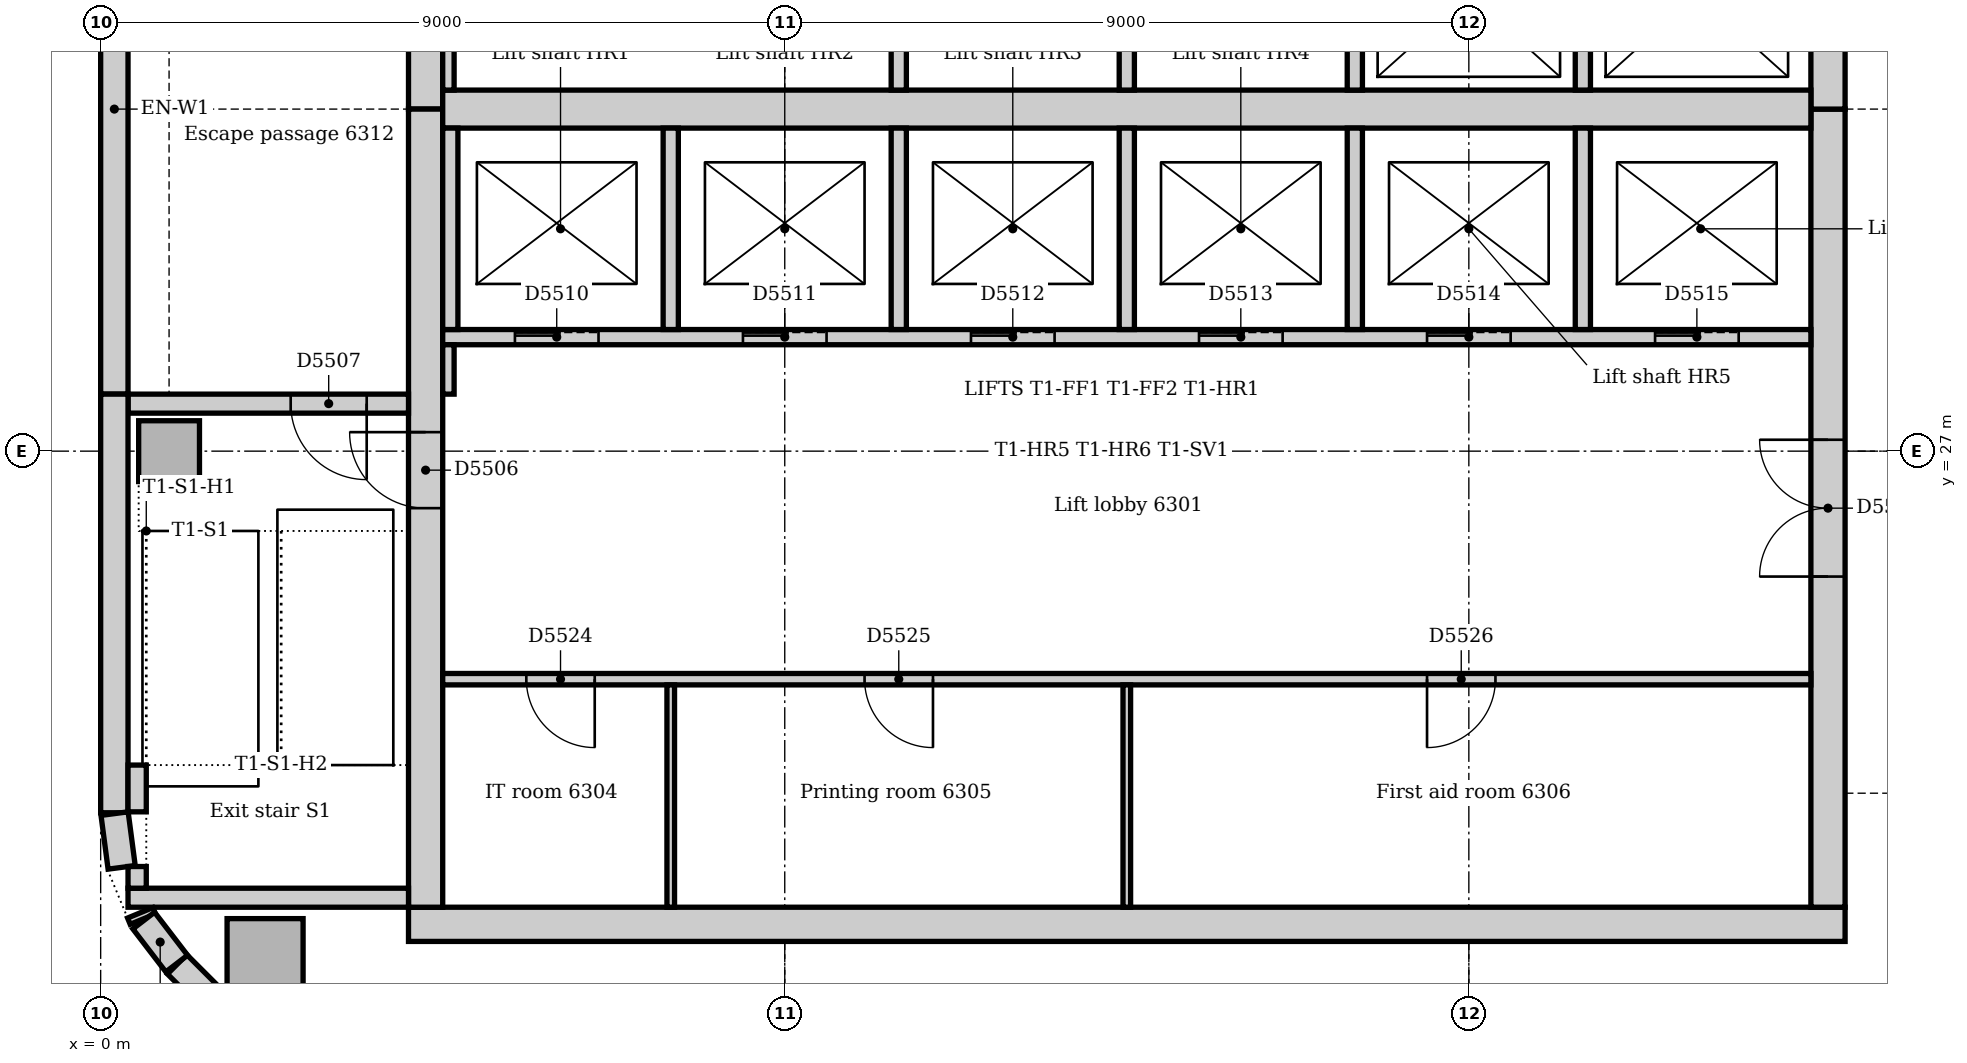
"""IFC4 building model, lengths in metres.
Left out: names, types, materials, properties, quantities, classifications, styles, units other than length and angle.
Written with IfcOpenShell. Run it as: python <this file> out.ifc"""

import sys

from ifc_helpers import new_model, si_unit, direction, frame, frame_2d, origin, origin_2d, place, context, subcontext, project, spatial, rectangle, extrude, element, fill, save


model = new_model("IFC4")
c1 = context("Model", 3, precision=1e-05, world=origin(), true_north=direction((0.0, 1.0)))
c2 = subcontext(c1, "Body", "Model", "MODEL_VIEW")
j1 = project(units=[si_unit("LENGTHUNIT", "METRE"), si_unit("PLANEANGLEUNIT", "RADIAN")], contexts=[c1])
p1 = place(None, origin())
s1 = spatial("IfcSite", under=j1, at=p1, CompositionType="ELEMENT")
p2 = place(p1, origin())
s2 = spatial("IfcBuilding", under=s1, at=p2, CompositionType="ELEMENT")
p3 = place(p2, frame((0.0, 0.0, 263.0)))
s3 = spatial("IfcBuildingStorey", under=s2, at=p3, CompositionType="ELEMENT", Elevation=263.0)
p4 = place(p3, frame((4.05, 20.775, 0.0), z_axis=(0.0, 0.0, 1.0), x_axis=(1.0, 0.0, 0.0)))
e1 = element("IfcWall", 1, at=p4, inside=s3, PredefinedType="SOLIDWALL", context=c2, shape_type="SweptSolid", body=[
    extrude(rectangle(XDim=18.9, YDim=0.45, at=frame_2d((9.45, 0.0))), origin(), (0.0, 0.0, 1.0), 4.0),
])
p5 = place(p3, frame((22.725, 21.0, 0.0), z_axis=(0.0, 0.0, 1.0), x_axis=(0.0, 1.0, 0.0)))
e2 = element("IfcWall", 2, at=p5, inside=s3, PredefinedType="SOLIDWALL", context=c2, shape_type="SweptSolid", body=[
    extrude(rectangle(XDim=10.5, YDim=0.45, at=frame_2d((5.25, 0.0))), origin(), (0.0, 0.0, 1.0), 4.0),
])
p6 = place(p5, frame((4.35, 0.0, 0.0)))
e3 = element("IfcOpeningElement", 3, at=p6, cuts=e2, PredefinedType="OPENING", context=c2, shape_type="SweptSolid", body=[
    extrude(rectangle(XDim=1.8, YDim=2.1, at=frame_2d((0.9, 1.05))), frame((0.0, 0.235, 0.0), z_axis=(0.0, -1.0, 0.0), x_axis=(1.0, 0.0, 0.0)), (0.0, 0.0, 1.0), 0.47),
])
p7 = place(p3, frame((22.725, 31.5, 0.0), z_axis=(0.0, 0.0, 1.0), x_axis=(0.0, 1.0, 0.0)))
e4 = element("IfcWall", 4, at=p7, inside=s3, PredefinedType="SOLIDWALL", context=c2, shape_type="SweptSolid", body=[
    extrude(rectangle(XDim=10.5, YDim=0.45, at=frame_2d((5.25, 0.0))), origin(), (0.0, 0.0, 1.0), 4.0),
])
p8 = place(p7, frame((3.15, 0.0, 0.0)))
e5 = element("IfcOpeningElement", 5, at=p8, cuts=e4, PredefinedType="OPENING", context=c2, shape_type="SweptSolid", body=[
    extrude(rectangle(XDim=1.0, YDim=2.1, at=frame_2d((0.5, 1.05))), frame((0.0, 0.235, 0.0), z_axis=(0.0, -1.0, 0.0), x_axis=(1.0, 0.0, 0.0)), (0.0, 0.0, 1.0), 0.47),
])
p9 = place(p7, frame((5.2, 0.0, 0.0)))
e6 = element("IfcOpeningElement", 6, at=p9, cuts=e4, PredefinedType="OPENING", context=c2, shape_type="SweptSolid", body=[
    extrude(rectangle(XDim=1.0, YDim=2.1, at=frame_2d((0.5, 1.05))), frame((0.0, 0.235, 0.0), z_axis=(0.0, -1.0, 0.0), x_axis=(1.0, 0.0, 0.0)), (0.0, 0.0, 1.0), 0.47),
])
p10 = place(p3, frame((4.275, 42.0, 0.0), z_axis=(0.0, 0.0, 1.0), x_axis=(0.0, -1.0, 0.0)))
e7 = element("IfcWall", 7, at=p10, inside=s3, PredefinedType="SOLIDWALL", context=c2, shape_type="SweptSolid", body=[
    extrude(rectangle(XDim=10.5, YDim=0.45, at=frame_2d((5.25, 0.0))), origin(), (0.0, 0.0, 1.0), 4.0),
])
p11 = place(p10, frame((5.3, 0.0, 0.0)))
e8 = element("IfcOpeningElement", 8, at=p11, cuts=e7, PredefinedType="OPENING", context=c2, shape_type="SweptSolid", body=[
    extrude(rectangle(XDim=1.0, YDim=2.1, at=frame_2d((0.5, 1.05))), frame((0.0, 0.235, 0.0), z_axis=(0.0, -1.0, 0.0), x_axis=(1.0, 0.0, 0.0)), (0.0, 0.0, 1.0), 0.47),
])
p12 = place(p3, frame((4.275, 31.5, 0.0), z_axis=(0.0, 0.0, 1.0), x_axis=(0.0, -1.0, 0.0)))
e9 = element("IfcWall", 9, at=p12, inside=s3, PredefinedType="SOLIDWALL", context=c2, shape_type="SweptSolid", body=[
    extrude(rectangle(XDim=10.5, YDim=0.45, at=frame_2d((5.25, 0.0))), origin(), (0.0, 0.0, 1.0), 4.0),
])
p13 = place(p12, frame((4.25, 0.0, 0.0)))
e10 = element("IfcOpeningElement", 10, at=p13, cuts=e9, PredefinedType="OPENING", context=c2, shape_type="SweptSolid", body=[
    extrude(rectangle(XDim=1.0, YDim=2.1, at=frame_2d((0.5, 1.05))), frame((0.0, 0.235, 0.0), z_axis=(0.0, -1.0, 0.0), x_axis=(1.0, 0.0, 0.0)), (0.0, 0.0, 1.0), 0.47),
])
p14 = place(p3, frame((4.5, 31.5, 0.0), z_axis=(0.0, 0.0, 1.0), x_axis=(1.0, 0.0, 0.0)))
e11 = element("IfcWall", 11, at=p14, inside=s3, PredefinedType="SOLIDWALL", context=c2, shape_type="SweptSolid", body=[
    extrude(rectangle(XDim=18.0, YDim=0.5, at=frame_2d((9.0, 0.0))), origin(), (0.0, 0.0, 1.0), 4.0),
])
p15 = place(p3, frame((0.36, 21.125, 0.0), z_axis=(0.0, 0.0, 1.0), x_axis=(1.0, 0.0, 0.0)))
e12 = element("IfcWall", 12, at=p15, inside=s3, PredefinedType="SOLIDWALL", context=c2, shape_type="SweptSolid", body=[
    extrude(rectangle(XDim=3.69, YDim=0.25, at=frame_2d((1.845, 0.0))), origin(), (0.0, 0.0, 1.0), 4.0),
])
p16 = place(p3, frame((4.05, 27.625, 0.0), z_axis=(0.0, 0.0, 1.0), x_axis=(-1.0, 0.0, 0.0)))
e13 = element("IfcWall", 13, at=p16, inside=s3, PredefinedType="SOLIDWALL", context=c2, shape_type="SweptSolid", body=[
    extrude(rectangle(XDim=3.69, YDim=0.25, at=frame_2d((1.845, 0.0))), origin(), (0.0, 0.0, 1.0), 4.0),
])
p17 = place(p16, frame((0.55, 0.0, 0.0)))
e14 = element("IfcOpeningElement", 14, at=p17, cuts=e13, PredefinedType="OPENING", context=c2, shape_type="SweptSolid", body=[
    extrude(rectangle(XDim=1.0, YDim=2.1, at=frame_2d((0.5, 1.05))), frame((0.0, 0.135, 0.0), z_axis=(0.0, -1.0, 0.0), x_axis=(1.0, 0.0, 0.0)), (0.0, 0.0, 1.0), 0.27),
])
p18 = place(p3, frame((2.163, 20.35, 0.0), z_axis=(0.0, 0.0, 1.0), x_axis=(1.0, 0.0, 0.0)))
e15 = element("IfcColumn", 15, at=p18, inside=s3, PredefinedType="COLUMN", context=c2, shape_type="SweptSolid", body=[
    extrude(rectangle(XDim=1.0, YDim=1.0, at=origin_2d()), origin(), (0.0, 0.0, 1.0), 3.85),
])
p19 = place(p3, frame((0.9, 27.0, 0.0), z_axis=(0.0, 0.0, 1.0), x_axis=(1.0, 0.0, 0.0)))
e16 = element("IfcColumn", 16, at=p19, inside=s3, PredefinedType="COLUMN", context=c2, shape_type="SweptSolid", body=[
    extrude(rectangle(XDim=0.8, YDim=0.8, at=origin_2d()), origin(), (0.0, 0.0, 1.0), 4.0),
])
p20 = place(p3, frame((0.18, 35.25, 0.0), z_axis=(0.0, 0.0, 1.0), x_axis=(0.0, -1.0, 0.0)))
e17 = element("IfcWall", 17, at=p20, inside=s3, PredefinedType="STANDARD", context=c2, shape_type="SweptSolid", body=[
    extrude(rectangle(XDim=7.5, YDim=0.36, at=frame_2d((3.75, 0.0))), origin(), (0.0, 0.0, 1.0), 3.85),
])
p21 = place(p3, frame((0.18, 27.75, 0.0), z_axis=(0.0, 0.0, 1.0), x_axis=(0.0, -1.0, 0.0)))
e18 = element("IfcWall", 18, at=p21, inside=s3, PredefinedType="STANDARD", context=c2, shape_type="SweptSolid", body=[
    extrude(rectangle(XDim=5.507, YDim=0.36, at=frame_2d((2.754, 0.0))), origin(), (0.0, 0.0, 1.0), 3.85),
])
p22 = place(p3, frame((1.006, 20.249, 0.0), z_axis=(0.0, 0.0, 1.0), x_axis=(0.707106781187, -0.707106781187, 0.0)))
e19 = element("IfcWall", 19, at=p22, inside=s3, PredefinedType="STANDARD", context=c2, shape_type="SweptSolid", body=[
    extrude(rectangle(XDim=1.757, YDim=0.36, at=frame_2d((0.879, 0.0))), origin(), (0.0, 0.0, 1.0), 3.85),
])
p23 = place(p3, frame((0.183, 22.231, 0.0), z_axis=(0.0, 0.0, 1.0), x_axis=(0.13055608231, -0.99144092581, 0.0)))
e20 = element("IfcWall", 20, at=p23, inside=s3, PredefinedType="STANDARD", context=c2, shape_type="SweptSolid", body=[
    extrude(rectangle(XDim=0.713, YDim=0.36, at=frame_2d((0.356, 0.0))), origin(), (0.0, 0.0, 1.0), 3.85),
])
p24 = place(p3, frame((0.521, 20.927, 0.0), z_axis=(0.0, 0.0, 1.0), x_axis=(0.382549378284, -0.923935048136, 0.0)))
e21 = element("IfcWall", 21, at=p24, inside=s3, PredefinedType="STANDARD", context=c2, shape_type="SweptSolid", body=[
    extrude(rectangle(XDim=0.089, YDim=0.36, at=frame_2d((0.045, 0.0))), origin(), (0.0, 0.0, 1.0), 3.85),
])
p25 = place(p3, frame((0.566, 20.825, 0.0), z_axis=(0.0, 0.0, 1.0), x_axis=(0.608802368033, -0.793321924995, 0.0)))
e22 = element("IfcWall", 22, at=p25, inside=s3, PredefinedType="STANDARD", context=c2, shape_type="SweptSolid", body=[
    extrude(rectangle(XDim=0.713, YDim=0.36, at=frame_2d((0.357, 0.0))), origin(), (0.0, 0.0, 1.0), 3.85),
])
p26 = place(p3, frame((0.48, 21.25, 0.0), z_axis=(0.0, 0.0, 1.0), x_axis=(0.0, 1.0, 0.0)))
e23 = element("IfcWall", 23, at=p26, inside=s3, PredefinedType="STANDARD", context=c2, shape_type="SweptSolid", body=[
    extrude(rectangle(XDim=0.285, YDim=0.24, at=frame_2d((0.143, 0.0))), origin(), (0.0, 0.0, 1.0), 4.0),
])
p27 = place(p3, frame((0.48, 22.255, 0.0), z_axis=(0.0, 0.0, 1.0), x_axis=(0.0, 1.0, 0.0)))
e24 = element("IfcWall", 24, at=p27, inside=s3, PredefinedType="STANDARD", context=c2, shape_type="SweptSolid", body=[
    extrude(rectangle(XDim=0.615, YDim=0.24, at=frame_2d((0.307, 0.0))), origin(), (0.0, 0.0, 1.0), 4.0),
])
p28 = place(p3, frame((4.5, 28.5, 0.0), z_axis=(0.0, 0.0, 1.0), x_axis=(1.0, 0.0, 0.0)))
e25 = element("IfcWall", 25, at=p28, inside=s3, PredefinedType="PARTITIONING", context=c2, shape_type="SweptSolid", body=[
    extrude(rectangle(XDim=18.0, YDim=0.2, at=frame_2d((9.0, 0.0))), origin(), (0.0, 0.0, 1.0), 3.85),
])
p29 = place(p28, frame((0.95, 0.0, 0.0)))
e26 = element("IfcOpeningElement", 26, at=p29, cuts=e25, PredefinedType="OPENING", context=c2, shape_type="SweptSolid", body=[
    extrude(rectangle(XDim=1.1, YDim=2.1, at=frame_2d((0.55, 1.05))), frame((0.0, 0.11, 0.0), z_axis=(0.0, -1.0, 0.0), x_axis=(1.0, 0.0, 0.0)), (0.0, 0.0, 1.0), 0.22),
])
p30 = place(p28, frame((3.95, 0.0, 0.0)))
e27 = element("IfcOpeningElement", 27, at=p30, cuts=e25, PredefinedType="OPENING", context=c2, shape_type="SweptSolid", body=[
    extrude(rectangle(XDim=1.1, YDim=2.1, at=frame_2d((0.55, 1.05))), frame((0.0, 0.11, 0.0), z_axis=(0.0, -1.0, 0.0), x_axis=(1.0, 0.0, 0.0)), (0.0, 0.0, 1.0), 0.22),
])
p31 = place(p28, frame((6.95, 0.0, 0.0)))
e28 = element("IfcOpeningElement", 28, at=p31, cuts=e25, PredefinedType="OPENING", context=c2, shape_type="SweptSolid", body=[
    extrude(rectangle(XDim=1.1, YDim=2.1, at=frame_2d((0.55, 1.05))), frame((0.0, 0.11, 0.0), z_axis=(0.0, -1.0, 0.0), x_axis=(1.0, 0.0, 0.0)), (0.0, 0.0, 1.0), 0.22),
])
p32 = place(p28, frame((9.95, 0.0, 0.0)))
e29 = element("IfcOpeningElement", 29, at=p32, cuts=e25, PredefinedType="OPENING", context=c2, shape_type="SweptSolid", body=[
    extrude(rectangle(XDim=1.1, YDim=2.1, at=frame_2d((0.55, 1.05))), frame((0.0, 0.11, 0.0), z_axis=(0.0, -1.0, 0.0), x_axis=(1.0, 0.0, 0.0)), (0.0, 0.0, 1.0), 0.22),
])
p33 = place(p28, frame((12.95, 0.0, 0.0)))
e30 = element("IfcOpeningElement", 30, at=p33, cuts=e25, PredefinedType="OPENING", context=c2, shape_type="SweptSolid", body=[
    extrude(rectangle(XDim=1.1, YDim=2.1, at=frame_2d((0.55, 1.05))), frame((0.0, 0.11, 0.0), z_axis=(0.0, -1.0, 0.0), x_axis=(1.0, 0.0, 0.0)), (0.0, 0.0, 1.0), 0.22),
])
p34 = place(p28, frame((15.95, 0.0, 0.0)))
e31 = element("IfcOpeningElement", 31, at=p34, cuts=e25, PredefinedType="OPENING", context=c2, shape_type="SweptSolid", body=[
    extrude(rectangle(XDim=1.1, YDim=2.1, at=frame_2d((0.55, 1.05))), frame((0.0, 0.11, 0.0), z_axis=(0.0, -1.0, 0.0), x_axis=(1.0, 0.0, 0.0)), (0.0, 0.0, 1.0), 0.22),
])
for number, where, z_axis, x_axis in (
    (32, (10.5, 28.6, 0.0), (0.0, 0.0, 1.0), (0.0, 1.0, 0.0)),
    (33, (10.5, 31.75, 0.0), (0.0, 0.0, 1.0), (0.0, 1.0, 0.0)),
    (34, (13.5, 28.6, 0.0), (0.0, 0.0, 1.0), (0.0, 1.0, 0.0)),
    (35, (13.5, 31.75, 0.0), (0.0, 0.0, 1.0), (0.0, 1.0, 0.0)),
    (36, (16.5, 28.6, 0.0), (0.0, 0.0, 1.0), (0.0, 1.0, 0.0)),
    (37, (16.5, 31.75, 0.0), (0.0, 0.0, 1.0), (0.0, 1.0, 0.0)),
    (38, (19.5, 28.6, 0.0), (0.0, 0.0, 1.0), (0.0, 1.0, 0.0)),
    (39, (19.5, 31.75, 0.0), (0.0, 0.0, 1.0), (0.0, 1.0, 0.0)),
    (40, (4.6, 28.6, 0.0), (0.0, 0.0, 1.0), (0.0, 1.0, 0.0)),
    (41, (7.5, 28.6, 0.0), (0.0, 0.0, 1.0), (0.0, 1.0, 0.0)),
):
    element("IfcWall", number, at=place(p3, frame(where, z_axis=z_axis, x_axis=x_axis)), inside=s3, PredefinedType="PARTITIONING", context=c2, shape_type="SweptSolid", body=[
        extrude(rectangle(XDim=2.65, YDim=0.2, at=frame_2d((1.325, 0.0))), origin(), (0.0, 0.0, 1.0), 3.85),
    ])
p35 = place(p3, frame((4.5, 24.0, 0.0), z_axis=(0.0, 0.0, 1.0), x_axis=(1.0, 0.0, 0.0)))
e42 = element("IfcWall", 42, at=p35, inside=s3, PredefinedType="PARTITIONING", context=c2, shape_type="SweptSolid", body=[
    extrude(rectangle(XDim=18.0, YDim=0.15, at=frame_2d((9.0, 0.0))), origin(), (0.0, 0.0, 1.0), 3.85),
])
p36 = place(p35, frame((1.1, 0.0, 0.0)))
e43 = element("IfcOpeningElement", 43, at=p36, cuts=e42, PredefinedType="OPENING", context=c2, shape_type="SweptSolid", body=[
    extrude(rectangle(XDim=0.9, YDim=2.1, at=frame_2d((0.45, 1.05))), frame((0.0, 0.085, 0.0), z_axis=(0.0, -1.0, 0.0), x_axis=(1.0, 0.0, 0.0)), (0.0, 0.0, 1.0), 0.17),
])
p37 = place(p35, frame((5.55, 0.0, 0.0)))
e44 = element("IfcOpeningElement", 44, at=p37, cuts=e42, PredefinedType="OPENING", context=c2, shape_type="SweptSolid", body=[
    extrude(rectangle(XDim=0.9, YDim=2.1, at=frame_2d((0.45, 1.05))), frame((0.0, 0.085, 0.0), z_axis=(0.0, -1.0, 0.0), x_axis=(1.0, 0.0, 0.0)), (0.0, 0.0, 1.0), 0.17),
])
p38 = place(p35, frame((12.95, 0.0, 0.0)))
e45 = element("IfcOpeningElement", 45, at=p38, cuts=e42, PredefinedType="OPENING", context=c2, shape_type="SweptSolid", body=[
    extrude(rectangle(XDim=0.9, YDim=2.1, at=frame_2d((0.45, 1.05))), frame((0.0, 0.085, 0.0), z_axis=(0.0, -1.0, 0.0), x_axis=(1.0, 0.0, 0.0)), (0.0, 0.0, 1.0), 0.17),
])
p39 = place(p3, frame((4.575, 31.75, 0.0), z_axis=(0.0, 0.0, 1.0), x_axis=(0.0, 1.0, 0.0)))
e46 = element("IfcWall", 46, at=p39, inside=s3, PredefinedType="PARTITIONING", context=c2, shape_type="SweptSolid", body=[
    extrude(rectangle(XDim=2.675, YDim=0.15, at=frame_2d((1.337, 0.0))), origin(), (0.0, 0.0, 1.0), 3.85),
])
p40 = place(p3, frame((4.575, 27.75, 0.0), z_axis=(0.0, 0.0, 1.0), x_axis=(0.0, 1.0, 0.0)))
e47 = element("IfcWall", 47, at=p40, inside=s3, PredefinedType="PARTITIONING", context=c2, shape_type="SweptSolid", body=[
    extrude(rectangle(XDim=0.65, YDim=0.15, at=frame_2d((0.325, 0.0))), origin(), (0.0, 0.0, 1.0), 3.85),
])
for number, where, z_axis, x_axis in (
    (48, (7.5, 21.0, 0.0), (0.0, 0.0, 1.0), (0.0, 1.0, 0.0)),
    (49, (13.5, 21.0, 0.0), (0.0, 0.0, 1.0), (0.0, 1.0, 0.0)),
):
    element("IfcWall", number, at=place(p3, frame(where, z_axis=z_axis, x_axis=x_axis)), inside=s3, PredefinedType="PARTITIONING", context=c2, shape_type="SweptSolid", body=[
        extrude(rectangle(XDim=2.925, YDim=0.1, at=frame_2d((1.462, 0.0))), origin(), (0.0, 0.0, 1.0), 3.85),
    ])
p41 = place(p13, frame((1.0, 0.0, 0.0), z_axis=(0.0, 0.0, 1.0), x_axis=(-1.0, 0.0, 0.0)))
e50 = element("IfcDoor", 50, at=p41, inside=s3, OperationType="SINGLE_SWING_RIGHT", PredefinedType="DOOR", context=c2, shape_type="SweptSolid", body=[
    extrude(rectangle(XDim=1.0, YDim=2.1, at=frame_2d((0.5, 1.05))), frame((0.0, 0.025, 0.0), z_axis=(0.0, -1.0, 0.0), x_axis=(1.0, 0.0, 0.0)), (0.0, 0.0, 1.0), 0.05),
])
fill(e10, e50)
p42 = place(p17, origin())
e51 = element("IfcDoor", 51, at=p42, inside=s3, OperationType="SINGLE_SWING_LEFT", PredefinedType="DOOR", context=c2, shape_type="SweptSolid", body=[
    extrude(rectangle(XDim=1.0, YDim=2.1, at=frame_2d((0.5, 1.05))), frame((0.0, 0.025, 0.0), z_axis=(0.0, -1.0, 0.0), x_axis=(1.0, 0.0, 0.0)), (0.0, 0.0, 1.0), 0.05),
])
fill(e14, e51)
p43 = place(p29, origin())
e52 = element("IfcDoor", 52, at=p43, inside=s3, OperationType="SLIDING_TO_LEFT", PredefinedType="DOOR", context=c2, shape_type="SweptSolid", body=[
    extrude(rectangle(XDim=1.1, YDim=2.1, at=frame_2d((0.55, 1.05))), frame((0.0, 0.025, 0.0), z_axis=(0.0, -1.0, 0.0), x_axis=(1.0, 0.0, 0.0)), (0.0, 0.0, 1.0), 0.05),
])
fill(e26, e52)
p44 = place(p30, origin())
e53 = element("IfcDoor", 53, at=p44, inside=s3, OperationType="SLIDING_TO_LEFT", PredefinedType="DOOR", context=c2, shape_type="SweptSolid", body=[
    extrude(rectangle(XDim=1.1, YDim=2.1, at=frame_2d((0.55, 1.05))), frame((0.0, 0.025, 0.0), z_axis=(0.0, -1.0, 0.0), x_axis=(1.0, 0.0, 0.0)), (0.0, 0.0, 1.0), 0.05),
])
fill(e27, e53)
p45 = place(p31, origin())
e54 = element("IfcDoor", 54, at=p45, inside=s3, OperationType="SLIDING_TO_LEFT", PredefinedType="DOOR", context=c2, shape_type="SweptSolid", body=[
    extrude(rectangle(XDim=1.1, YDim=2.1, at=frame_2d((0.55, 1.05))), frame((0.0, 0.025, 0.0), z_axis=(0.0, -1.0, 0.0), x_axis=(1.0, 0.0, 0.0)), (0.0, 0.0, 1.0), 0.05),
])
fill(e28, e54)
p46 = place(p32, origin())
e55 = element("IfcDoor", 55, at=p46, inside=s3, OperationType="SLIDING_TO_LEFT", PredefinedType="DOOR", context=c2, shape_type="SweptSolid", body=[
    extrude(rectangle(XDim=1.1, YDim=2.1, at=frame_2d((0.55, 1.05))), frame((0.0, 0.025, 0.0), z_axis=(0.0, -1.0, 0.0), x_axis=(1.0, 0.0, 0.0)), (0.0, 0.0, 1.0), 0.05),
])
fill(e29, e55)
p47 = place(p33, origin())
e56 = element("IfcDoor", 56, at=p47, inside=s3, OperationType="SLIDING_TO_LEFT", PredefinedType="DOOR", context=c2, shape_type="SweptSolid", body=[
    extrude(rectangle(XDim=1.1, YDim=2.1, at=frame_2d((0.55, 1.05))), frame((0.0, 0.025, 0.0), z_axis=(0.0, -1.0, 0.0), x_axis=(1.0, 0.0, 0.0)), (0.0, 0.0, 1.0), 0.05),
])
fill(e30, e56)
p48 = place(p34, origin())
e57 = element("IfcDoor", 57, at=p48, inside=s3, OperationType="SLIDING_TO_LEFT", PredefinedType="DOOR", context=c2, shape_type="SweptSolid", body=[
    extrude(rectangle(XDim=1.1, YDim=2.1, at=frame_2d((0.55, 1.05))), frame((0.0, 0.025, 0.0), z_axis=(0.0, -1.0, 0.0), x_axis=(1.0, 0.0, 0.0)), (0.0, 0.0, 1.0), 0.05),
])
fill(e31, e57)
p49 = place(p6, origin())
e58 = element("IfcDoor", 58, at=p49, inside=s3, OperationType="DOUBLE_DOOR_DOUBLE_SWING", PredefinedType="DOOR", context=c2, shape_type="SweptSolid", body=[
    extrude(rectangle(XDim=1.8, YDim=2.1, at=frame_2d((0.9, 1.05))), frame((0.0, 0.025, 0.0), z_axis=(0.0, -1.0, 0.0), x_axis=(1.0, 0.0, 0.0)), (0.0, 0.0, 1.0), 0.05),
])
fill(e3, e58)
p50 = place(p36, frame((0.9, 0.0, 0.0), z_axis=(0.0, 0.0, 1.0), x_axis=(-1.0, 0.0, 0.0)))
e59 = element("IfcDoor", 59, at=p50, inside=s3, OperationType="SINGLE_SWING_LEFT", PredefinedType="DOOR", context=c2, shape_type="SweptSolid", body=[
    extrude(rectangle(XDim=0.9, YDim=2.1, at=frame_2d((0.45, 1.05))), frame((0.0, 0.025, 0.0), z_axis=(0.0, -1.0, 0.0), x_axis=(1.0, 0.0, 0.0)), (0.0, 0.0, 1.0), 0.05),
])
fill(e43, e59)
p51 = place(p37, frame((0.9, 0.0, 0.0), z_axis=(0.0, 0.0, 1.0), x_axis=(-1.0, 0.0, 0.0)))
e60 = element("IfcDoor", 60, at=p51, inside=s3, OperationType="SINGLE_SWING_LEFT", PredefinedType="DOOR", context=c2, shape_type="SweptSolid", body=[
    extrude(rectangle(XDim=0.9, YDim=2.1, at=frame_2d((0.45, 1.05))), frame((0.0, 0.025, 0.0), z_axis=(0.0, -1.0, 0.0), x_axis=(1.0, 0.0, 0.0)), (0.0, 0.0, 1.0), 0.05),
])
fill(e44, e60)
p52 = place(p38, frame((0.9, 0.0, 0.0), z_axis=(0.0, 0.0, 1.0), x_axis=(-1.0, 0.0, 0.0)))
e61 = element("IfcDoor", 61, at=p52, inside=s3, OperationType="SINGLE_SWING_RIGHT", PredefinedType="DOOR", context=c2, shape_type="SweptSolid", body=[
    extrude(rectangle(XDim=0.9, YDim=2.1, at=frame_2d((0.45, 1.05))), frame((0.0, 0.025, 0.0), z_axis=(0.0, -1.0, 0.0), x_axis=(1.0, 0.0, 0.0)), (0.0, 0.0, 1.0), 0.05),
])
fill(e45, e61)
save(model, sys.argv[1])
